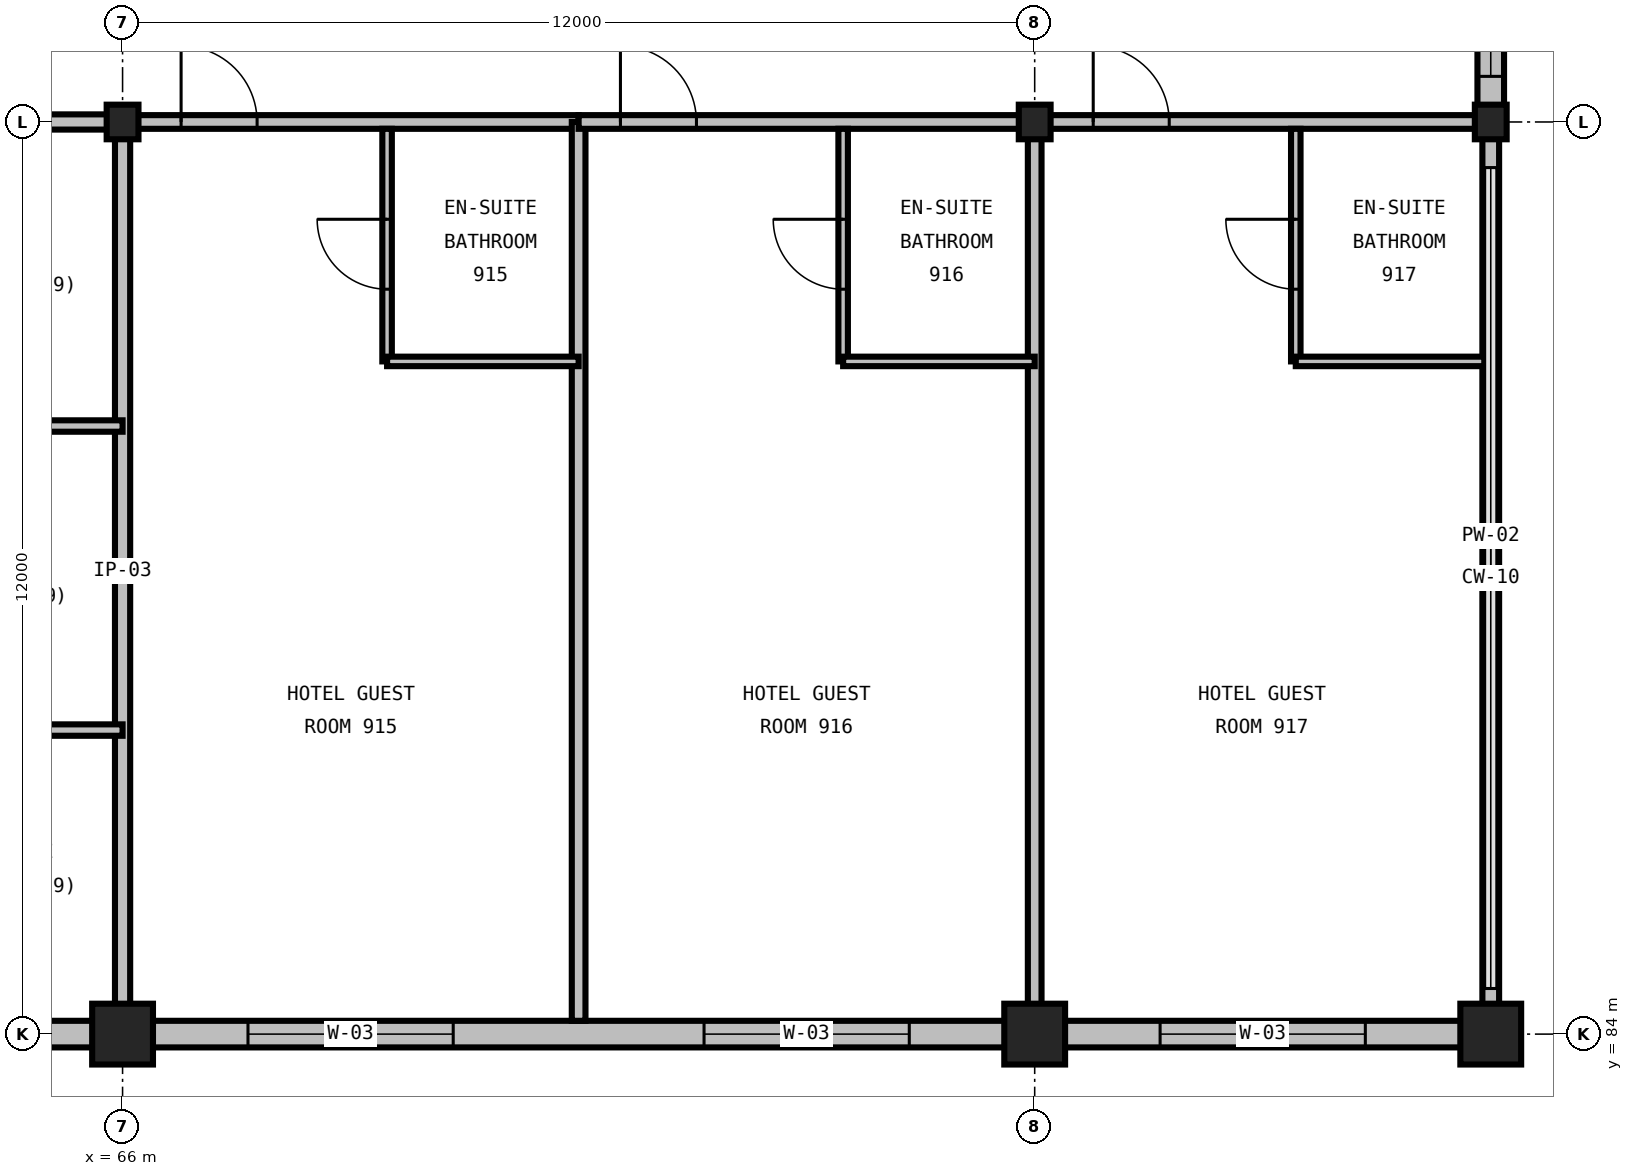
"""IFC4 building model, lengths in metres.
Left out: names, types, materials, properties, quantities, classifications, styles, units other than length and angle.
Written with IfcOpenShell. Run it as: python <this file> out.ifc"""

import sys

from ifc_helpers import new_model, si_unit, direction, frame, frame_2d, origin, origin_2d, place, context, subcontext, project, spatial, rectangle, i_section, extrude, element, fill, save


model = new_model("IFC4")
c1 = context("Model", 3, precision=1e-05, world=origin(), true_north=direction((0.0, 1.0)))
c2 = subcontext(c1, "Body", "Model", "MODEL_VIEW")
j1 = project(units=[si_unit("LENGTHUNIT", "METRE"), si_unit("PLANEANGLEUNIT", "RADIAN")], contexts=[c1])
p1 = place(None, origin())
s1 = spatial("IfcSite", under=j1, at=p1, CompositionType="ELEMENT")
p2 = place(p1, origin())
s2 = spatial("IfcBuilding", under=s1, at=p2, CompositionType="ELEMENT")
p3 = place(p2, frame((0.0, 0.0, 42.0)))
s3 = spatial("IfcBuildingStorey", under=s2, at=p3, CompositionType="ELEMENT", Elevation=42.0)
p4 = place(p3, frame((66.0, 84.0, 0.0), z_axis=(0.0, 0.0, 1.0), x_axis=(1.0, 0.0, 0.0)))
e1 = element("IfcColumn", 1, at=p4, inside=s3, PredefinedType="COLUMN", context=c2, shape_type="SweptSolid", body=[
    extrude(rectangle(XDim=0.8, YDim=0.8, at=origin_2d()), origin(), (0.0, 0.0, 1.0), 3.6),
])
p5 = place(p3, frame((66.0, 96.0, 0.0), z_axis=(0.0, 0.0, 1.0), x_axis=(1.0, 0.0, 0.0)))
e2 = element("IfcColumn", 2, at=p5, inside=s3, PredefinedType="COLUMN", context=c2, shape_type="SweptSolid", body=[
    extrude(i_section(OverallWidth=0.419, OverallDepth=0.455, WebThickness=0.042, FlangeThickness=0.068, FilletRadius=0.031, at=origin_2d()), origin(), (0.0, 0.0, 1.0), 3.6),
])
p6 = place(p3, frame((78.0, 84.0, 0.0), z_axis=(0.0, 0.0, 1.0), x_axis=(1.0, 0.0, 0.0)))
e3 = element("IfcColumn", 3, at=p6, inside=s3, PredefinedType="COLUMN", context=c2, shape_type="SweptSolid", body=[
    extrude(rectangle(XDim=0.8, YDim=0.8, at=origin_2d()), origin(), (0.0, 0.0, 1.0), 3.6),
])
p7 = place(p3, frame((78.0, 96.0, 0.0), z_axis=(0.0, 0.0, 1.0), x_axis=(1.0, 0.0, 0.0)))
e4 = element("IfcColumn", 4, at=p7, inside=s3, PredefinedType="COLUMN", context=c2, shape_type="SweptSolid", body=[
    extrude(i_section(OverallWidth=0.419, OverallDepth=0.455, WebThickness=0.042, FlangeThickness=0.068, FilletRadius=0.031, at=origin_2d()), origin(), (0.0, 0.0, 1.0), 3.6),
])
p8 = place(p3, frame((84.0, 84.0, 0.0), z_axis=(0.0, 0.0, 1.0), x_axis=(1.0, 0.0, 0.0)))
e5 = element("IfcColumn", 5, at=p8, inside=s3, PredefinedType="COLUMN", context=c2, shape_type="SweptSolid", body=[
    extrude(rectangle(XDim=0.8, YDim=0.8, at=origin_2d()), origin(), (0.0, 0.0, 1.0), 3.6),
])
p9 = place(p3, frame((84.0, 96.0, 0.0), z_axis=(0.0, 0.0, 1.0), x_axis=(1.0, 0.0, 0.0)))
e6 = element("IfcColumn", 6, at=p9, inside=s3, PredefinedType="COLUMN", context=c2, shape_type="SweptSolid", body=[
    extrude(i_section(OverallWidth=0.419, OverallDepth=0.455, WebThickness=0.042, FlangeThickness=0.068, FilletRadius=0.031, at=origin_2d()), origin(), (0.0, 0.0, 1.0), 3.6),
])
p10 = place(p3, frame((54.0, 84.0, 0.0), z_axis=(0.0, 0.0, 1.0), x_axis=(1.0, 0.0, 0.0)))
e7 = element("IfcWall", 7, at=p10, inside=s3, PredefinedType="STANDARD", context=c2, shape_type="SweptSolid", body=[
    extrude(rectangle(XDim=12.0, YDim=0.35, at=frame_2d((6.0, 0.0))), origin(), (0.0, 0.0, 1.0), 2.486),
])
p11 = place(p10, frame((2.3, 0.0, 1.0)))
e8 = element("IfcOpeningElement", 8, at=p11, cuts=e7, PredefinedType="OPENING", context=c2, shape_type="SweptSolid", body=[
    extrude(rectangle(XDim=1.4, YDim=1.4, at=frame_2d((0.7, 0.7))), frame((0.0, 0.19, 0.0), z_axis=(0.0, -1.0, 0.0), x_axis=(1.0, 0.0, 0.0)), (0.0, 0.0, 1.0), 0.38),
])
p12 = place(p10, frame((8.25, 0.0, 1.0)))
e9 = element("IfcOpeningElement", 9, at=p12, cuts=e7, PredefinedType="OPENING", context=c2, shape_type="SweptSolid", body=[
    extrude(rectangle(XDim=1.5, YDim=1.35, at=frame_2d((0.75, 0.675))), frame((0.0, 0.19, 0.0), z_axis=(0.0, -1.0, 0.0), x_axis=(1.0, 0.0, 0.0)), (0.0, 0.0, 1.0), 0.38),
])
p13 = place(p3, frame((66.0, 84.0, 0.0), z_axis=(0.0, 0.0, 1.0), x_axis=(1.0, 0.0, 0.0)))
e10 = element("IfcWall", 10, at=p13, inside=s3, PredefinedType="STANDARD", context=c2, shape_type="SweptSolid", body=[
    extrude(rectangle(XDim=12.0, YDim=0.35, at=frame_2d((6.0, 0.0))), origin(), (0.0, 0.0, 1.0), 2.486),
])
p14 = place(p13, frame((1.65, 0.0, 0.72)))
e11 = element("IfcOpeningElement", 11, at=p14, cuts=e10, PredefinedType="OPENING", context=c2, shape_type="SweptSolid", body=[
    extrude(rectangle(XDim=2.7, YDim=1.65, at=frame_2d((1.35, 0.825))), frame((0.0, 0.19, 0.0), z_axis=(0.0, -1.0, 0.0), x_axis=(1.0, 0.0, 0.0)), (0.0, 0.0, 1.0), 0.38),
])
p15 = place(p13, frame((7.65, 0.0, 0.72)))
e12 = element("IfcOpeningElement", 12, at=p15, cuts=e10, PredefinedType="OPENING", context=c2, shape_type="SweptSolid", body=[
    extrude(rectangle(XDim=2.7, YDim=1.65, at=frame_2d((1.35, 0.825))), frame((0.0, 0.19, 0.0), z_axis=(0.0, -1.0, 0.0), x_axis=(1.0, 0.0, 0.0)), (0.0, 0.0, 1.0), 0.38),
])
p16 = place(p3, frame((78.0, 84.0, 0.0), z_axis=(0.0, 0.0, 1.0), x_axis=(1.0, 0.0, 0.0)))
e13 = element("IfcWall", 13, at=p16, inside=s3, PredefinedType="STANDARD", context=c2, shape_type="SweptSolid", body=[
    extrude(rectangle(XDim=6.0, YDim=0.35, at=frame_2d((3.0, 0.0))), origin(), (0.0, 0.0, 1.0), 2.486),
])
p17 = place(p16, frame((1.65, 0.0, 0.72)))
e14 = element("IfcOpeningElement", 14, at=p17, cuts=e13, PredefinedType="OPENING", context=c2, shape_type="SweptSolid", body=[
    extrude(rectangle(XDim=2.7, YDim=1.65, at=frame_2d((1.35, 0.825))), frame((0.0, 0.19, 0.0), z_axis=(0.0, -1.0, 0.0), x_axis=(1.0, 0.0, 0.0)), (0.0, 0.0, 1.0), 0.38),
])
p18 = place(p3, frame((84.0, 84.0, 0.0), z_axis=(0.0, 0.0, 1.0), x_axis=(0.0, 1.0, 0.0)))
e15 = element("IfcWall", 15, at=p18, inside=s3, PredefinedType="PARAPET", context=c2, shape_type="SweptSolid", body=[
    extrude(rectangle(XDim=12.0, YDim=0.22, at=frame_2d((6.0, 0.0))), origin(), (0.0, 0.0, 1.0), 0.2),
])
p19 = place(p3, frame((84.0, 96.0, 0.0), z_axis=(0.0, 0.0, 1.0), x_axis=(0.0, 1.0, 0.0)))
e16 = element("IfcWall", 16, at=p19, inside=s3, PredefinedType="STANDARD", context=c2, shape_type="SweptSolid", body=[
    extrude(rectangle(XDim=9.0, YDim=0.35, at=frame_2d((4.5, 0.0))), origin(), (0.0, 0.0, 1.0), 2.981),
])
p20 = place(p19, frame((0.6, 0.0, 0.85)))
e17 = element("IfcOpeningElement", 17, at=p20, cuts=e16, PredefinedType="OPENING", context=c2, shape_type="SweptSolid", body=[
    extrude(rectangle(XDim=1.8, YDim=1.5, at=frame_2d((0.9, 0.75))), frame((0.0, 0.19, 0.0), z_axis=(0.0, -1.0, 0.0), x_axis=(1.0, 0.0, 0.0)), (0.0, 0.0, 1.0), 0.38),
])
p21 = place(p3, frame((66.0, 84.175, 0.0), z_axis=(0.0, 0.0, 1.0), x_axis=(0.0, 1.0, 0.0)))
e18 = element("IfcWall", 18, at=p21, inside=s3, PredefinedType="PARTITIONING", context=c2, shape_type="SweptSolid", body=[
    extrude(rectangle(XDim=11.825, YDim=0.2, at=frame_2d((5.913, 0.0))), origin(), (0.0, 0.0, 1.0), 2.59),
])
p22 = place(p3, frame((60.8, 96.0, 0.0), z_axis=(0.0, 0.0, 1.0), x_axis=(1.0, 0.0, 0.0)))
e19 = element("IfcWall", 19, at=p22, inside=s3, PredefinedType="PARTITIONING", context=c2, shape_type="SweptSolid", body=[
    extrude(rectangle(XDim=5.2, YDim=0.2, at=frame_2d((2.6, 0.0))), origin(), (0.0, 0.0, 1.0), 2.359),
])
for number, where, z_axis, x_axis in (
    (20, (60.8, 88.0, 0.0), (0.0, 0.0, 1.0), (1.0, 0.0, 0.0)),
    (21, (60.8, 92.0, 0.0), (0.0, 0.0, 1.0), (1.0, 0.0, 0.0)),
):
    element("IfcWall", number, at=place(p3, frame(where, z_axis=z_axis, x_axis=x_axis)), inside=s3, PredefinedType="PARTITIONING", context=c2, shape_type="SweptSolid", body=[
        extrude(rectangle(XDim=5.2, YDim=0.15, at=frame_2d((2.6, 0.0))), origin(), (0.0, 0.0, 1.0), 3.29),
    ])
p23 = place(p3, frame((66.0, 96.0, 0.0), z_axis=(0.0, 0.0, 1.0), x_axis=(1.0, 0.0, 0.0)))
e22 = element("IfcWall", 22, at=p23, inside=s3, PredefinedType="PARTITIONING", context=c2, shape_type="SweptSolid", body=[
    extrude(rectangle(XDim=6.0, YDim=0.18, at=frame_2d((3.0, 0.0))), origin(), (0.0, 0.0, 1.0), 2.664),
])
p24 = place(p23, frame((0.77, 0.0, 0.0)))
e23 = element("IfcOpeningElement", 23, at=p24, cuts=e22, PredefinedType="OPENING", context=c2, shape_type="SweptSolid", body=[
    extrude(rectangle(XDim=1.0, YDim=2.15, at=frame_2d((0.5, 1.075))), frame((0.0, 0.105, 0.0), z_axis=(0.0, -1.0, 0.0), x_axis=(1.0, 0.0, 0.0)), (0.0, 0.0, 1.0), 0.21),
])
p25 = place(p3, frame((72.0, 84.175, 0.0), z_axis=(0.0, 0.0, 1.0), x_axis=(0.0, 1.0, 0.0)))
e24 = element("IfcWall", 24, at=p25, inside=s3, PredefinedType="PARTITIONING", context=c2, shape_type="SweptSolid", body=[
    extrude(rectangle(XDim=11.825, YDim=0.18, at=frame_2d((5.913, 0.0))), origin(), (0.0, 0.0, 1.0), 3.29),
])
p26 = place(p3, frame((69.48, 92.85, 0.0), z_axis=(0.0, 0.0, 1.0), x_axis=(0.0, 1.0, 0.0)))
e25 = element("IfcWall", 25, at=p26, inside=s3, PredefinedType="PARTITIONING", context=c2, shape_type="SweptSolid", body=[
    extrude(rectangle(XDim=3.06, YDim=0.125, at=frame_2d((1.53, 0.0))), origin(), (0.0, 0.0, 1.0), 3.29),
])
p27 = place(p26, frame((0.95, 0.0, 0.0)))
e26 = element("IfcOpeningElement", 26, at=p27, cuts=e25, PredefinedType="OPENING", context=c2, shape_type="SweptSolid", body=[
    extrude(rectangle(XDim=0.92, YDim=2.1, at=frame_2d((0.46, 1.05))), frame((0.0, 0.077, 0.0), z_axis=(0.0, -1.0, 0.0), x_axis=(1.0, 0.0, 0.0)), (0.0, 0.0, 1.0), 0.155),
])
p28 = place(p3, frame((69.48, 92.85, 0.0), z_axis=(0.0, 0.0, 1.0), x_axis=(1.0, 0.0, 0.0)))
e27 = element("IfcWall", 27, at=p28, inside=s3, PredefinedType="PARTITIONING", context=c2, shape_type="SweptSolid", body=[
    extrude(rectangle(XDim=2.52, YDim=0.125, at=frame_2d((1.26, 0.0))), origin(), (0.0, 0.0, 1.0), 3.29),
])
p29 = place(p3, frame((72.0, 96.0, 0.0), z_axis=(0.0, 0.0, 1.0), x_axis=(1.0, 0.0, 0.0)))
e28 = element("IfcWall", 28, at=p29, inside=s3, PredefinedType="PARTITIONING", context=c2, shape_type="SweptSolid", body=[
    extrude(rectangle(XDim=6.0, YDim=0.18, at=frame_2d((3.0, 0.0))), origin(), (0.0, 0.0, 1.0), 2.664),
])
p30 = place(p29, frame((0.55, 0.0, 0.0)))
e29 = element("IfcOpeningElement", 29, at=p30, cuts=e28, PredefinedType="OPENING", context=c2, shape_type="SweptSolid", body=[
    extrude(rectangle(XDim=1.0, YDim=2.15, at=frame_2d((0.5, 1.075))), frame((0.0, 0.105, 0.0), z_axis=(0.0, -1.0, 0.0), x_axis=(1.0, 0.0, 0.0)), (0.0, 0.0, 1.0), 0.21),
])
p31 = place(p3, frame((78.0, 84.175, 0.0), z_axis=(0.0, 0.0, 1.0), x_axis=(0.0, 1.0, 0.0)))
e30 = element("IfcWall", 30, at=p31, inside=s3, PredefinedType="PARTITIONING", context=c2, shape_type="SweptSolid", body=[
    extrude(rectangle(XDim=11.825, YDim=0.18, at=frame_2d((5.913, 0.0))), origin(), (0.0, 0.0, 1.0), 2.59),
])
p32 = place(p3, frame((75.48, 92.85, 0.0), z_axis=(0.0, 0.0, 1.0), x_axis=(0.0, 1.0, 0.0)))
e31 = element("IfcWall", 31, at=p32, inside=s3, PredefinedType="PARTITIONING", context=c2, shape_type="SweptSolid", body=[
    extrude(rectangle(XDim=3.06, YDim=0.125, at=frame_2d((1.53, 0.0))), origin(), (0.0, 0.0, 1.0), 3.29),
])
p33 = place(p32, frame((0.95, 0.0, 0.0)))
e32 = element("IfcOpeningElement", 32, at=p33, cuts=e31, PredefinedType="OPENING", context=c2, shape_type="SweptSolid", body=[
    extrude(rectangle(XDim=0.92, YDim=2.1, at=frame_2d((0.46, 1.05))), frame((0.0, 0.077, 0.0), z_axis=(0.0, -1.0, 0.0), x_axis=(1.0, 0.0, 0.0)), (0.0, 0.0, 1.0), 0.155),
])
p34 = place(p3, frame((75.48, 92.85, 0.0), z_axis=(0.0, 0.0, 1.0), x_axis=(1.0, 0.0, 0.0)))
e33 = element("IfcWall", 33, at=p34, inside=s3, PredefinedType="PARTITIONING", context=c2, shape_type="SweptSolid", body=[
    extrude(rectangle(XDim=2.52, YDim=0.125, at=frame_2d((1.26, 0.0))), origin(), (0.0, 0.0, 1.0), 3.29),
])
p35 = place(p3, frame((78.0, 96.0, 0.0), z_axis=(0.0, 0.0, 1.0), x_axis=(1.0, 0.0, 0.0)))
e34 = element("IfcWall", 34, at=p35, inside=s3, PredefinedType="PARTITIONING", context=c2, shape_type="SweptSolid", body=[
    extrude(rectangle(XDim=5.915, YDim=0.18, at=frame_2d((2.957, 0.0))), origin(), (0.0, 0.0, 1.0), 2.736),
])
p36 = place(p35, frame((0.77, 0.0, 0.0)))
e35 = element("IfcOpeningElement", 35, at=p36, cuts=e34, PredefinedType="OPENING", context=c2, shape_type="SweptSolid", body=[
    extrude(rectangle(XDim=1.0, YDim=2.15, at=frame_2d((0.5, 1.075))), frame((0.0, 0.105, 0.0), z_axis=(0.0, -1.0, 0.0), x_axis=(1.0, 0.0, 0.0)), (0.0, 0.0, 1.0), 0.21),
])
p37 = place(p3, frame((81.435, 92.85, 0.0), z_axis=(0.0, 0.0, 1.0), x_axis=(0.0, 1.0, 0.0)))
e36 = element("IfcWall", 36, at=p37, inside=s3, PredefinedType="PARTITIONING", context=c2, shape_type="SweptSolid", body=[
    extrude(rectangle(XDim=3.06, YDim=0.125, at=frame_2d((1.53, 0.0))), origin(), (0.0, 0.0, 1.0), 3.29),
])
p38 = place(p37, frame((0.95, 0.0, 0.0)))
e37 = element("IfcOpeningElement", 37, at=p38, cuts=e36, PredefinedType="OPENING", context=c2, shape_type="SweptSolid", body=[
    extrude(rectangle(XDim=0.92, YDim=2.1, at=frame_2d((0.46, 1.05))), frame((0.0, 0.077, 0.0), z_axis=(0.0, -1.0, 0.0), x_axis=(1.0, 0.0, 0.0)), (0.0, 0.0, 1.0), 0.155),
])
p39 = place(p3, frame((81.435, 92.85, 0.0), z_axis=(0.0, 0.0, 1.0), x_axis=(1.0, 0.0, 0.0)))
e38 = element("IfcWall", 38, at=p39, inside=s3, PredefinedType="PARTITIONING", context=c2, shape_type="SweptSolid", body=[
    extrude(rectangle(XDim=2.48, YDim=0.125, at=frame_2d((1.24, 0.0))), origin(), (0.0, 0.0, 1.0), 3.29),
])
p40 = place(p14, origin())
e39 = element("IfcWindow", 39, at=p40, inside=s3, PartitioningType="TRIPLE_PANEL_VERTICAL", PredefinedType="WINDOW", context=c2, shape_type="SweptSolid", body=[
    extrude(rectangle(XDim=2.7, YDim=1.65, at=frame_2d((1.35, 0.825))), frame((0.0, 0.03, 0.0), z_axis=(0.0, -1.0, 0.0), x_axis=(1.0, 0.0, 0.0)), (0.0, 0.0, 1.0), 0.06),
])
fill(e11, e39)
p41 = place(p15, origin())
e40 = element("IfcWindow", 40, at=p41, inside=s3, PartitioningType="TRIPLE_PANEL_VERTICAL", PredefinedType="WINDOW", context=c2, shape_type="SweptSolid", body=[
    extrude(rectangle(XDim=2.7, YDim=1.65, at=frame_2d((1.35, 0.825))), frame((0.0, 0.03, 0.0), z_axis=(0.0, -1.0, 0.0), x_axis=(1.0, 0.0, 0.0)), (0.0, 0.0, 1.0), 0.06),
])
fill(e12, e40)
p42 = place(p17, origin())
e41 = element("IfcWindow", 41, at=p42, inside=s3, PartitioningType="TRIPLE_PANEL_VERTICAL", PredefinedType="WINDOW", context=c2, shape_type="SweptSolid", body=[
    extrude(rectangle(XDim=2.7, YDim=1.65, at=frame_2d((1.35, 0.825))), frame((0.0, 0.03, 0.0), z_axis=(0.0, -1.0, 0.0), x_axis=(1.0, 0.0, 0.0)), (0.0, 0.0, 1.0), 0.06),
])
fill(e14, e41)
p43 = place(p20, origin())
e42 = element("IfcWindow", 42, at=p43, inside=s3, PartitioningType="SINGLE_PANEL", PredefinedType="WINDOW", context=c2, shape_type="SweptSolid", body=[
    extrude(rectangle(XDim=1.8, YDim=1.5, at=frame_2d((0.9, 0.75))), frame((0.0, 0.03, 0.0), z_axis=(0.0, -1.0, 0.0), x_axis=(1.0, 0.0, 0.0)), (0.0, 0.0, 1.0), 0.06),
])
fill(e17, e42)
p44 = place(p24, origin())
e43 = element("IfcDoor", 43, at=p44, inside=s3, OperationType="SINGLE_SWING_LEFT", PredefinedType="DOOR", context=c2, shape_type="SweptSolid", body=[
    extrude(rectangle(XDim=1.0, YDim=2.15, at=frame_2d((0.5, 1.075))), frame((0.0, 0.025, 0.0), z_axis=(0.0, -1.0, 0.0), x_axis=(1.0, 0.0, 0.0)), (0.0, 0.0, 1.0), 0.05),
])
fill(e23, e43)
p45 = place(p27, origin())
e44 = element("IfcDoor", 44, at=p45, inside=s3, OperationType="SINGLE_SWING_RIGHT", PredefinedType="DOOR", context=c2, shape_type="SweptSolid", body=[
    extrude(rectangle(XDim=0.92, YDim=2.1, at=frame_2d((0.46, 1.05))), frame((0.0, 0.025, 0.0), z_axis=(0.0, -1.0, 0.0), x_axis=(1.0, 0.0, 0.0)), (0.0, 0.0, 1.0), 0.05),
])
fill(e26, e44)
p46 = place(p30, origin())
e45 = element("IfcDoor", 45, at=p46, inside=s3, OperationType="SINGLE_SWING_LEFT", PredefinedType="DOOR", context=c2, shape_type="SweptSolid", body=[
    extrude(rectangle(XDim=1.0, YDim=2.15, at=frame_2d((0.5, 1.075))), frame((0.0, 0.025, 0.0), z_axis=(0.0, -1.0, 0.0), x_axis=(1.0, 0.0, 0.0)), (0.0, 0.0, 1.0), 0.05),
])
fill(e29, e45)
p47 = place(p33, origin())
e46 = element("IfcDoor", 46, at=p47, inside=s3, OperationType="SINGLE_SWING_RIGHT", PredefinedType="DOOR", context=c2, shape_type="SweptSolid", body=[
    extrude(rectangle(XDim=0.92, YDim=2.1, at=frame_2d((0.46, 1.05))), frame((0.0, 0.025, 0.0), z_axis=(0.0, -1.0, 0.0), x_axis=(1.0, 0.0, 0.0)), (0.0, 0.0, 1.0), 0.05),
])
fill(e32, e46)
p48 = place(p36, origin())
e47 = element("IfcDoor", 47, at=p48, inside=s3, OperationType="SINGLE_SWING_LEFT", PredefinedType="DOOR", context=c2, shape_type="SweptSolid", body=[
    extrude(rectangle(XDim=1.0, YDim=2.15, at=frame_2d((0.5, 1.075))), frame((0.0, 0.025, 0.0), z_axis=(0.0, -1.0, 0.0), x_axis=(1.0, 0.0, 0.0)), (0.0, 0.0, 1.0), 0.05),
])
fill(e35, e47)
p49 = place(p38, origin())
e48 = element("IfcDoor", 48, at=p49, inside=s3, OperationType="SINGLE_SWING_RIGHT", PredefinedType="DOOR", context=c2, shape_type="SweptSolid", body=[
    extrude(rectangle(XDim=0.92, YDim=2.1, at=frame_2d((0.46, 1.05))), frame((0.0, 0.025, 0.0), z_axis=(0.0, -1.0, 0.0), x_axis=(1.0, 0.0, 0.0)), (0.0, 0.0, 1.0), 0.05),
])
fill(e37, e48)
save(model, sys.argv[1])
